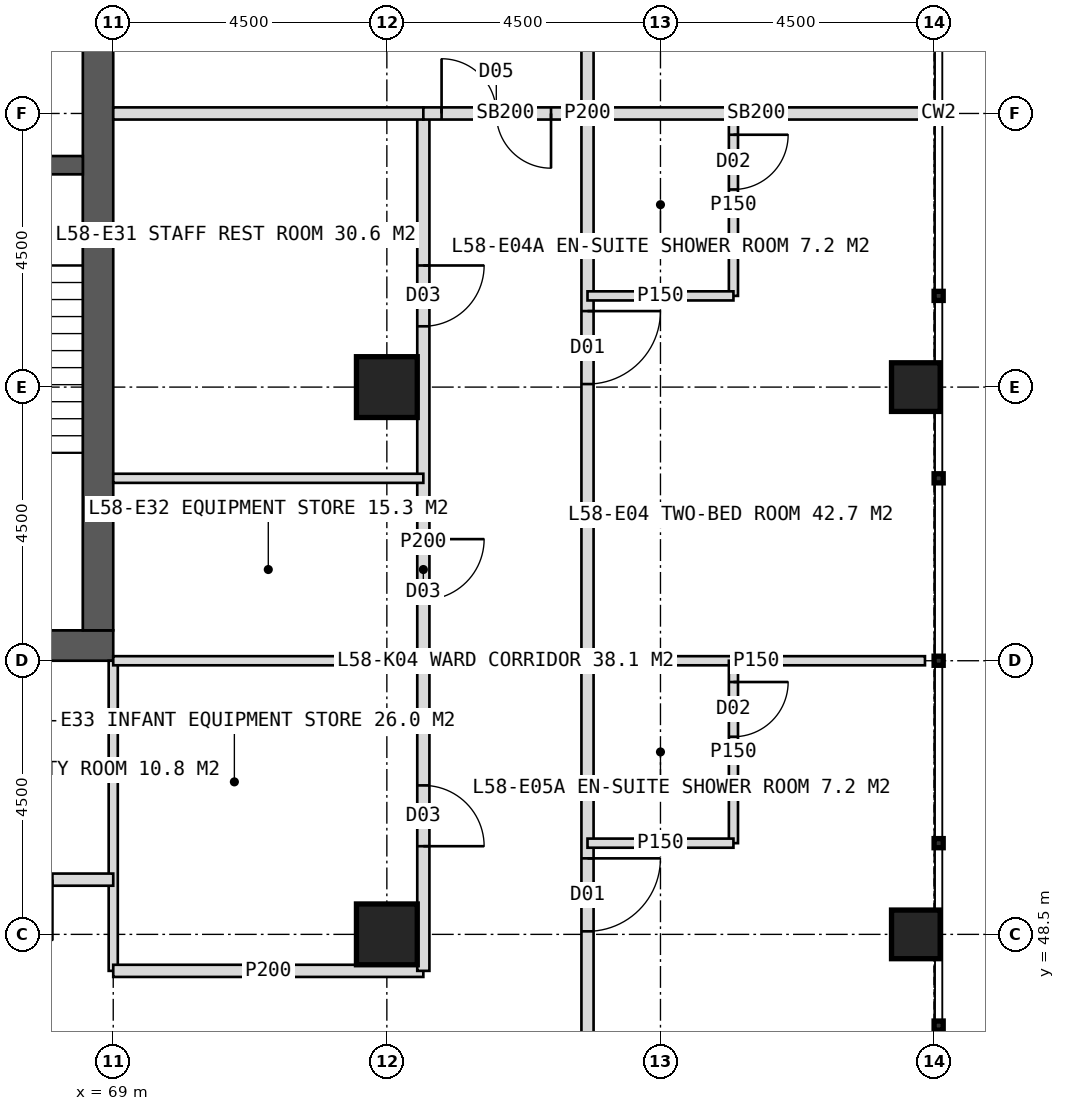
"""IFC4 building model, lengths in metres.
Left out: names, types, materials, properties, quantities, classifications, styles, units other than length and angle.
Written with IfcOpenShell. Run it as: python <this file> out.ifc"""

import sys

from ifc_helpers import new_model, si_unit, direction, frame, frame_2d, origin, origin_2d, place, context, subcontext, project, spatial, rectangle, hollow_rectangle, extrude, element, fill, save


model = new_model("IFC4")
c1 = context("Model", 3, precision=1e-05, world=origin(), true_north=direction((0.0, 1.0)))
c2 = subcontext(c1, "Body", "Model", "MODEL_VIEW")
j1 = project(units=[si_unit("LENGTHUNIT", "METRE"), si_unit("PLANEANGLEUNIT", "RADIAN")], contexts=[c1])
p1 = place(None, origin())
s1 = spatial("IfcSite", under=j1, at=p1, CompositionType="ELEMENT")
p2 = place(p1, origin())
s2 = spatial("IfcBuilding", under=s1, at=p2, CompositionType="ELEMENT")
p3 = place(p2, frame((0.0, 0.0, 241.0)))
s3 = spatial("IfcBuildingStorey", under=s2, at=p3, CompositionType="ELEMENT", Elevation=241.0)
p4 = place(p3, frame((51.0, 53.25, 0.0), z_axis=(0.0, 0.0, 1.0), x_axis=(1.0, 0.0, 0.0)))
e1 = element("IfcWall", 1, at=p4, inside=s3, PredefinedType="SHEAR", context=c2, shape_type="SweptSolid", body=[
    extrude(rectangle(XDim=18.0, YDim=0.5, at=frame_2d((9.0, 0.0))), origin(), (0.0, 0.0, 1.0), 4.0),
])
p5 = place(p4, frame((8.1, 0.0, 0.0)))
e2 = element("IfcOpeningElement", 2, at=p5, cuts=e1, PredefinedType="OPENING", context=c2, shape_type="SweptSolid", body=[
    extrude(rectangle(XDim=1.8, YDim=2.2, at=frame_2d((0.9, 1.1))), frame((0.0, 0.26, 0.0), z_axis=(0.0, -1.0, 0.0), x_axis=(1.0, 0.0, 0.0)), (0.0, 0.0, 1.0), 0.52),
])
p6 = place(p3, frame((68.75, 53.5, 0.0), z_axis=(0.0, 0.0, 1.0), x_axis=(0.0, 1.0, 0.0)))
e3 = element("IfcWall", 3, at=p6, inside=s3, PredefinedType="SHEAR", context=c2, shape_type="SweptSolid", body=[
    extrude(rectangle(XDim=17.0, YDim=0.5, at=frame_2d((8.5, 0.0))), origin(), (0.0, 0.0, 1.0), 4.0),
])
p7 = place(p6, frame((9.6, 0.0, 0.0)))
e4 = element("IfcOpeningElement", 4, at=p7, cuts=e3, PredefinedType="OPENING", context=c2, shape_type="SweptSolid", body=[
    extrude(rectangle(XDim=1.5, YDim=2.2, at=frame_2d((0.75, 1.1))), frame((0.0, 0.26, 0.0), z_axis=(0.0, -1.0, 0.0), x_axis=(1.0, 0.0, 0.0)), (0.0, 0.0, 1.0), 0.52),
])
p8 = place(p3, frame((65.2, 61.15, 0.0), z_axis=(0.0, 0.0, 1.0), x_axis=(1.0, 0.0, 0.0)))
e5 = element("IfcWall", 5, at=p8, inside=s3, PredefinedType="SHEAR", context=c2, shape_type="SweptSolid", body=[
    extrude(rectangle(XDim=3.3, YDim=0.3, at=frame_2d((1.65, 0.0))), origin(), (0.0, 0.0, 1.0), 4.0),
])
p9 = place(p8, frame((1.05, 0.0, 0.0)))
e6 = element("IfcOpeningElement", 6, at=p9, cuts=e5, PredefinedType="OPENING", context=c2, shape_type="SweptSolid", body=[
    extrude(rectangle(XDim=1.2, YDim=2.1, at=frame_2d((0.6, 1.05))), frame((0.0, 0.16, 0.0), z_axis=(0.0, -1.0, 0.0), x_axis=(1.0, 0.0, 0.0)), (0.0, 0.0, 1.0), 0.32),
])
for number, where, z_axis, x_axis in (
    (7, (73.5, 48.5, 0.0), (0.0, 0.0, 1.0), (1.0, 0.0, 0.0)),
    (8, (73.5, 57.5, 0.0), (0.0, 0.0, 1.0), (1.0, 0.0, 0.0)),
):
    element("IfcColumn", number, at=place(p3, frame(where, z_axis=z_axis, x_axis=x_axis)), inside=s3, PredefinedType="COLUMN", context=c2, shape_type="SweptSolid", body=[
        extrude(hollow_rectangle(XDim=1.0, YDim=1.0, WallThickness=0.1, at=origin_2d()), origin(), (0.0, 0.0, 1.0), 4.0),
    ])
for number, where, z_axis, x_axis in (
    (9, (82.2, 48.5, 0.0), (0.0, 0.0, 1.0), (1.0, 0.0, 0.0)),
    (10, (82.2, 57.5, 0.0), (0.0, 0.0, 1.0), (1.0, 0.0, 0.0)),
):
    element("IfcColumn", number, at=place(p3, frame(where, z_axis=z_axis, x_axis=x_axis)), inside=s3, PredefinedType="COLUMN", context=c2, shape_type="SweptSolid", body=[
        extrude(hollow_rectangle(XDim=0.8, YDim=0.8, WallThickness=0.08, at=origin_2d()), origin(), (0.0, 0.0, 1.0), 4.0),
    ])
p10 = place(p3, frame((69.0, 53.0, 0.0), z_axis=(0.0, 0.0, 1.0), x_axis=(0.0, -1.0, 0.0)))
e11 = element("IfcWall", 11, at=p10, inside=s3, PredefinedType="PARTITIONING", context=c2, shape_type="SweptSolid", body=[
    extrude(rectangle(XDim=5.1, YDim=0.15, at=frame_2d((2.55, 0.0))), origin(), (0.0, 0.0, 1.0), 3.75),
])
p11 = place(p3, frame((74.1, 47.9, 0.0), z_axis=(0.0, 0.0, 1.0), x_axis=(-1.0, 0.0, 0.0)))
e12 = element("IfcWall", 12, at=p11, inside=s3, PredefinedType="PARTITIONING", context=c2, shape_type="SweptSolid", body=[
    extrude(rectangle(XDim=5.1, YDim=0.2, at=frame_2d((2.55, 0.0))), origin(), (0.0, 0.0, 1.0), 3.75),
])
p12 = place(p3, frame((69.0, 49.4, 0.0), z_axis=(0.0, 0.0, 1.0), x_axis=(-1.0, 0.0, 0.0)))
e13 = element("IfcWall", 13, at=p12, inside=s3, PredefinedType="PARTITIONING", context=c2, shape_type="SweptSolid", body=[
    extrude(rectangle(XDim=6.75, YDim=0.2, at=frame_2d((3.375, 0.0))), origin(), (0.0, 0.0, 1.0), 3.75),
])
p13 = place(p12, frame((1.0, 0.0, 0.0)))
e14 = element("IfcOpeningElement", 14, at=p13, cuts=e13, PredefinedType="OPENING", context=c2, shape_type="SweptSolid", body=[
    extrude(rectangle(XDim=1.0, YDim=2.1, at=frame_2d((0.5, 1.05))), frame((0.0, 0.11, 0.0), z_axis=(0.0, -1.0, 0.0), x_axis=(1.0, 0.0, 0.0)), (0.0, 0.0, 1.0), 0.22),
])
p14 = place(p12, frame((5.425, 0.0, 0.0)))
e15 = element("IfcOpeningElement", 15, at=p14, cuts=e13, PredefinedType="OPENING", context=c2, shape_type="SweptSolid", body=[
    extrude(rectangle(XDim=1.0, YDim=2.1, at=frame_2d((0.5, 1.05))), frame((0.0, 0.11, 0.0), z_axis=(0.0, -1.0, 0.0), x_axis=(1.0, 0.0, 0.0)), (0.0, 0.0, 1.0), 0.22),
])
p15 = place(p3, frame((76.8, 62.0, 0.0), z_axis=(0.0, 0.0, 1.0), x_axis=(1.0, 0.0, 0.0)))
e16 = element("IfcWall", 16, at=p15, inside=s3, PredefinedType="SOLIDWALL", context=c2, shape_type="SweptSolid", body=[
    extrude(rectangle(XDim=5.55, YDim=0.2, at=frame_2d((2.775, 0.0))), origin(), (0.0, 0.0, 1.0), 2.95),
])
p16 = place(p3, frame((76.8, 53.0, 0.0), z_axis=(0.0, 0.0, 1.0), x_axis=(1.0, 0.0, 0.0)))
e17 = element("IfcWall", 17, at=p16, inside=s3, PredefinedType="PARTITIONING", context=c2, shape_type="SweptSolid", body=[
    extrude(rectangle(XDim=5.55, YDim=0.15, at=frame_2d((2.775, 0.0))), origin(), (0.0, 0.0, 1.0), 3.75),
])
p17 = place(p3, frame((76.8, 78.8, 0.0), z_axis=(0.0, 0.0, 1.0), x_axis=(0.0, -1.0, 0.0)))
e18 = element("IfcWall", 18, at=p17, inside=s3, PredefinedType="PARTITIONING", context=c2, shape_type="SweptSolid", body=[
    extrude(rectangle(XDim=33.6, YDim=0.2, at=frame_2d((16.8, 0.0))), origin(), (0.0, 0.0, 1.0), 3.75),
])
p18 = place(p17, frame((2.65, 0.0, 0.0)))
e19 = element("IfcOpeningElement", 19, at=p18, cuts=e18, PredefinedType="OPENING", context=c2, shape_type="SweptSolid", body=[
    extrude(rectangle(XDim=1.2, YDim=2.2, at=frame_2d((0.6, 1.1))), frame((0.0, 0.11, 0.0), z_axis=(0.0, -1.0, 0.0), x_axis=(1.0, 0.0, 0.0)), (0.0, 0.0, 1.0), 0.22),
])
p19 = place(p17, frame((7.45, 0.0, 0.0)))
e20 = element("IfcOpeningElement", 20, at=p19, cuts=e18, PredefinedType="OPENING", context=c2, shape_type="SweptSolid", body=[
    extrude(rectangle(XDim=1.2, YDim=2.2, at=frame_2d((0.6, 1.1))), frame((0.0, 0.11, 0.0), z_axis=(0.0, -1.0, 0.0), x_axis=(1.0, 0.0, 0.0)), (0.0, 0.0, 1.0), 0.22),
])
p20 = place(p17, frame((13.45, 0.0, 0.0)))
e21 = element("IfcOpeningElement", 21, at=p20, cuts=e18, PredefinedType="OPENING", context=c2, shape_type="SweptSolid", body=[
    extrude(rectangle(XDim=1.2, YDim=2.2, at=frame_2d((0.6, 1.1))), frame((0.0, 0.11, 0.0), z_axis=(0.0, -1.0, 0.0), x_axis=(1.0, 0.0, 0.0)), (0.0, 0.0, 1.0), 0.22),
])
p21 = place(p17, frame((20.05, 0.0, 0.0)))
e22 = element("IfcOpeningElement", 22, at=p21, cuts=e18, PredefinedType="OPENING", context=c2, shape_type="SweptSolid", body=[
    extrude(rectangle(XDim=1.2, YDim=2.2, at=frame_2d((0.6, 1.1))), frame((0.0, 0.11, 0.0), z_axis=(0.0, -1.0, 0.0), x_axis=(1.0, 0.0, 0.0)), (0.0, 0.0, 1.0), 0.22),
])
p22 = place(p17, frame((29.05, 0.0, 0.0)))
e23 = element("IfcOpeningElement", 23, at=p22, cuts=e18, PredefinedType="OPENING", context=c2, shape_type="SweptSolid", body=[
    extrude(rectangle(XDim=1.2, YDim=2.2, at=frame_2d((0.6, 1.1))), frame((0.0, 0.11, 0.0), z_axis=(0.0, -1.0, 0.0), x_axis=(1.0, 0.0, 0.0)), (0.0, 0.0, 1.0), 0.22),
])
p23 = place(p3, frame((79.2, 62.0, 0.0), z_axis=(0.0, 0.0, 1.0), x_axis=(0.0, -1.0, 0.0)))
e24 = element("IfcWall", 24, at=p23, inside=s3, PredefinedType="PARTITIONING", context=c2, shape_type="SweptSolid", body=[
    extrude(rectangle(XDim=3.0, YDim=0.15, at=frame_2d((1.5, 0.0))), origin(), (0.0, 0.0, 1.0), 3.75),
])
p24 = place(p23, frame((0.35, 0.0, 0.0)))
e25 = element("IfcOpeningElement", 25, at=p24, cuts=e24, PredefinedType="OPENING", context=c2, shape_type="SweptSolid", body=[
    extrude(rectangle(XDim=0.9, YDim=2.1, at=frame_2d((0.45, 1.05))), frame((0.0, 0.085, 0.0), z_axis=(0.0, -1.0, 0.0), x_axis=(1.0, 0.0, 0.0)), (0.0, 0.0, 1.0), 0.17),
])
p25 = place(p3, frame((76.8, 59.0, 0.0), z_axis=(0.0, 0.0, 1.0), x_axis=(1.0, 0.0, 0.0)))
e26 = element("IfcWall", 26, at=p25, inside=s3, PredefinedType="PARTITIONING", context=c2, shape_type="SweptSolid", body=[
    extrude(rectangle(XDim=2.4, YDim=0.15, at=frame_2d((1.2, 0.0))), origin(), (0.0, 0.0, 1.0), 3.75),
])
p26 = place(p3, frame((79.2, 53.0, 0.0), z_axis=(0.0, 0.0, 1.0), x_axis=(0.0, -1.0, 0.0)))
e27 = element("IfcWall", 27, at=p26, inside=s3, PredefinedType="PARTITIONING", context=c2, shape_type="SweptSolid", body=[
    extrude(rectangle(XDim=3.0, YDim=0.15, at=frame_2d((1.5, 0.0))), origin(), (0.0, 0.0, 1.0), 3.75),
])
p27 = place(p26, frame((0.35, 0.0, 0.0)))
e28 = element("IfcOpeningElement", 28, at=p27, cuts=e27, PredefinedType="OPENING", context=c2, shape_type="SweptSolid", body=[
    extrude(rectangle(XDim=0.9, YDim=2.1, at=frame_2d((0.45, 1.05))), frame((0.0, 0.085, 0.0), z_axis=(0.0, -1.0, 0.0), x_axis=(1.0, 0.0, 0.0)), (0.0, 0.0, 1.0), 0.17),
])
p28 = place(p3, frame((76.8, 50.0, 0.0), z_axis=(0.0, 0.0, 1.0), x_axis=(1.0, 0.0, 0.0)))
e29 = element("IfcWall", 29, at=p28, inside=s3, PredefinedType="PARTITIONING", context=c2, shape_type="SweptSolid", body=[
    extrude(rectangle(XDim=2.4, YDim=0.15, at=frame_2d((1.2, 0.0))), origin(), (0.0, 0.0, 1.0), 3.75),
])
p29 = place(p3, frame((74.1, 62.0, 0.0), z_axis=(0.0, 0.0, 1.0), x_axis=(0.0, -1.0, 0.0)))
e30 = element("IfcWall", 30, at=p29, inside=s3, PredefinedType="PARTITIONING", context=c2, shape_type="SweptSolid", body=[
    extrude(rectangle(XDim=14.1, YDim=0.2, at=frame_2d((7.05, 0.0))), origin(), (0.0, 0.0, 1.0), 3.75),
])
p30 = place(p29, frame((2.5, 0.0, 0.0)))
e31 = element("IfcOpeningElement", 31, at=p30, cuts=e30, PredefinedType="OPENING", context=c2, shape_type="SweptSolid", body=[
    extrude(rectangle(XDim=1.0, YDim=2.1, at=frame_2d((0.5, 1.05))), frame((0.0, 0.11, 0.0), z_axis=(0.0, -1.0, 0.0), x_axis=(1.0, 0.0, 0.0)), (0.0, 0.0, 1.0), 0.22),
])
p31 = place(p29, frame((7.0, 0.0, 0.0)))
e32 = element("IfcOpeningElement", 32, at=p31, cuts=e30, PredefinedType="OPENING", context=c2, shape_type="SweptSolid", body=[
    extrude(rectangle(XDim=1.0, YDim=2.1, at=frame_2d((0.5, 1.05))), frame((0.0, 0.11, 0.0), z_axis=(0.0, -1.0, 0.0), x_axis=(1.0, 0.0, 0.0)), (0.0, 0.0, 1.0), 0.22),
])
p32 = place(p29, frame((11.05, 0.0, 0.0)))
e33 = element("IfcOpeningElement", 33, at=p32, cuts=e30, PredefinedType="OPENING", context=c2, shape_type="SweptSolid", body=[
    extrude(rectangle(XDim=1.0, YDim=2.1, at=frame_2d((0.5, 1.05))), frame((0.0, 0.11, 0.0), z_axis=(0.0, -1.0, 0.0), x_axis=(1.0, 0.0, 0.0)), (0.0, 0.0, 1.0), 0.22),
])
p33 = place(p3, frame((69.0, 62.0, 0.0), z_axis=(0.0, 0.0, 1.0), x_axis=(1.0, 0.0, 0.0)))
e34 = element("IfcWall", 34, at=p33, inside=s3, PredefinedType="SOLIDWALL", context=c2, shape_type="SweptSolid", body=[
    extrude(rectangle(XDim=5.1, YDim=0.2, at=frame_2d((2.55, 0.0))), origin(), (0.0, 0.0, 1.0), 2.95),
])
for number, where, z_axis, x_axis in (
    (35, (69.0, 56.0, 0.0), (0.0, 0.0, 1.0), (1.0, 0.0, 0.0)),
    (36, (69.0, 53.0, 0.0), (0.0, 0.0, 1.0), (1.0, 0.0, 0.0)),
):
    element("IfcWall", number, at=place(p3, frame(where, z_axis=z_axis, x_axis=x_axis)), inside=s3, PredefinedType="PARTITIONING", context=c2, shape_type="SweptSolid", body=[
        extrude(rectangle(XDim=5.1, YDim=0.15, at=frame_2d((2.55, 0.0))), origin(), (0.0, 0.0, 1.0), 3.75),
    ])
p34 = place(p3, frame((74.1, 62.0, 0.0), z_axis=(0.0, 0.0, 1.0), x_axis=(1.0, 0.0, 0.0)))
e37 = element("IfcWall", 37, at=p34, inside=s3, PredefinedType="SOLIDWALL", context=c2, shape_type="SweptSolid", body=[
    extrude(rectangle(XDim=2.7, YDim=0.2, at=frame_2d((1.35, 0.0))), origin(), (0.0, 0.0, 1.0), 2.95),
])
p35 = place(p34, frame((0.3, 0.0, 0.0)))
e38 = element("IfcOpeningElement", 38, at=p35, cuts=e37, PredefinedType="OPENING", context=c2, shape_type="SweptSolid", body=[
    extrude(rectangle(XDim=1.8, YDim=2.2, at=frame_2d((0.9, 1.1))), frame((0.0, 0.11, 0.0), z_axis=(0.0, -1.0, 0.0), x_axis=(1.0, 0.0, 0.0)), (0.0, 0.0, 1.0), 0.22),
])
p36 = place(p21, origin())
e39 = element("IfcDoor", 39, at=p36, inside=s3, OperationType="SINGLE_SWING_LEFT", PredefinedType="DOOR", context=c2, shape_type="SweptSolid", body=[
    extrude(rectangle(XDim=1.2, YDim=2.2, at=frame_2d((0.6, 1.1))), frame((0.0, 0.025, 0.0), z_axis=(0.0, -1.0, 0.0), x_axis=(1.0, 0.0, 0.0)), (0.0, 0.0, 1.0), 0.05),
])
fill(e22, e39)
p37 = place(p24, origin())
e40 = element("IfcDoor", 40, at=p37, inside=s3, OperationType="SINGLE_SWING_LEFT", PredefinedType="DOOR", context=c2, shape_type="SweptSolid", body=[
    extrude(rectangle(XDim=0.9, YDim=2.1, at=frame_2d((0.45, 1.05))), frame((0.0, 0.025, 0.0), z_axis=(0.0, -1.0, 0.0), x_axis=(1.0, 0.0, 0.0)), (0.0, 0.0, 1.0), 0.05),
])
fill(e25, e40)
p38 = place(p22, origin())
e41 = element("IfcDoor", 41, at=p38, inside=s3, OperationType="SINGLE_SWING_LEFT", PredefinedType="DOOR", context=c2, shape_type="SweptSolid", body=[
    extrude(rectangle(XDim=1.2, YDim=2.2, at=frame_2d((0.6, 1.1))), frame((0.0, 0.025, 0.0), z_axis=(0.0, -1.0, 0.0), x_axis=(1.0, 0.0, 0.0)), (0.0, 0.0, 1.0), 0.05),
])
fill(e23, e41)
p39 = place(p27, origin())
e42 = element("IfcDoor", 42, at=p39, inside=s3, OperationType="SINGLE_SWING_LEFT", PredefinedType="DOOR", context=c2, shape_type="SweptSolid", body=[
    extrude(rectangle(XDim=0.9, YDim=2.1, at=frame_2d((0.45, 1.05))), frame((0.0, 0.025, 0.0), z_axis=(0.0, -1.0, 0.0), x_axis=(1.0, 0.0, 0.0)), (0.0, 0.0, 1.0), 0.05),
])
fill(e28, e42)
p40 = place(p30, origin())
e43 = element("IfcDoor", 43, at=p40, inside=s3, OperationType="SINGLE_SWING_LEFT", PredefinedType="DOOR", context=c2, shape_type="SweptSolid", body=[
    extrude(rectangle(XDim=1.0, YDim=2.1, at=frame_2d((0.5, 1.05))), frame((0.0, 0.025, 0.0), z_axis=(0.0, -1.0, 0.0), x_axis=(1.0, 0.0, 0.0)), (0.0, 0.0, 1.0), 0.05),
])
fill(e31, e43)
p41 = place(p31, origin())
e44 = element("IfcDoor", 44, at=p41, inside=s3, OperationType="SINGLE_SWING_LEFT", PredefinedType="DOOR", context=c2, shape_type="SweptSolid", body=[
    extrude(rectangle(XDim=1.0, YDim=2.1, at=frame_2d((0.5, 1.05))), frame((0.0, 0.025, 0.0), z_axis=(0.0, -1.0, 0.0), x_axis=(1.0, 0.0, 0.0)), (0.0, 0.0, 1.0), 0.05),
])
fill(e32, e44)
p42 = place(p32, origin())
e45 = element("IfcDoor", 45, at=p42, inside=s3, OperationType="SINGLE_SWING_RIGHT", PredefinedType="DOOR", context=c2, shape_type="SweptSolid", body=[
    extrude(rectangle(XDim=1.0, YDim=2.1, at=frame_2d((0.5, 1.05))), frame((0.0, 0.025, 0.0), z_axis=(0.0, -1.0, 0.0), x_axis=(1.0, 0.0, 0.0)), (0.0, 0.0, 1.0), 0.05),
])
fill(e33, e45)
p43 = place(p35, origin())
e46 = element("IfcDoor", 46, at=p43, inside=s3, OperationType="DOUBLE_DOOR_DOUBLE_SWING", PredefinedType="DOOR", context=c2, shape_type="SweptSolid", body=[
    extrude(rectangle(XDim=1.8, YDim=2.2, at=frame_2d((0.9, 1.1))), frame((0.0, 0.025, 0.0), z_axis=(0.0, -1.0, 0.0), x_axis=(1.0, 0.0, 0.0)), (0.0, 0.0, 1.0), 0.05),
])
fill(e38, e46)
save(model, sys.argv[1])
